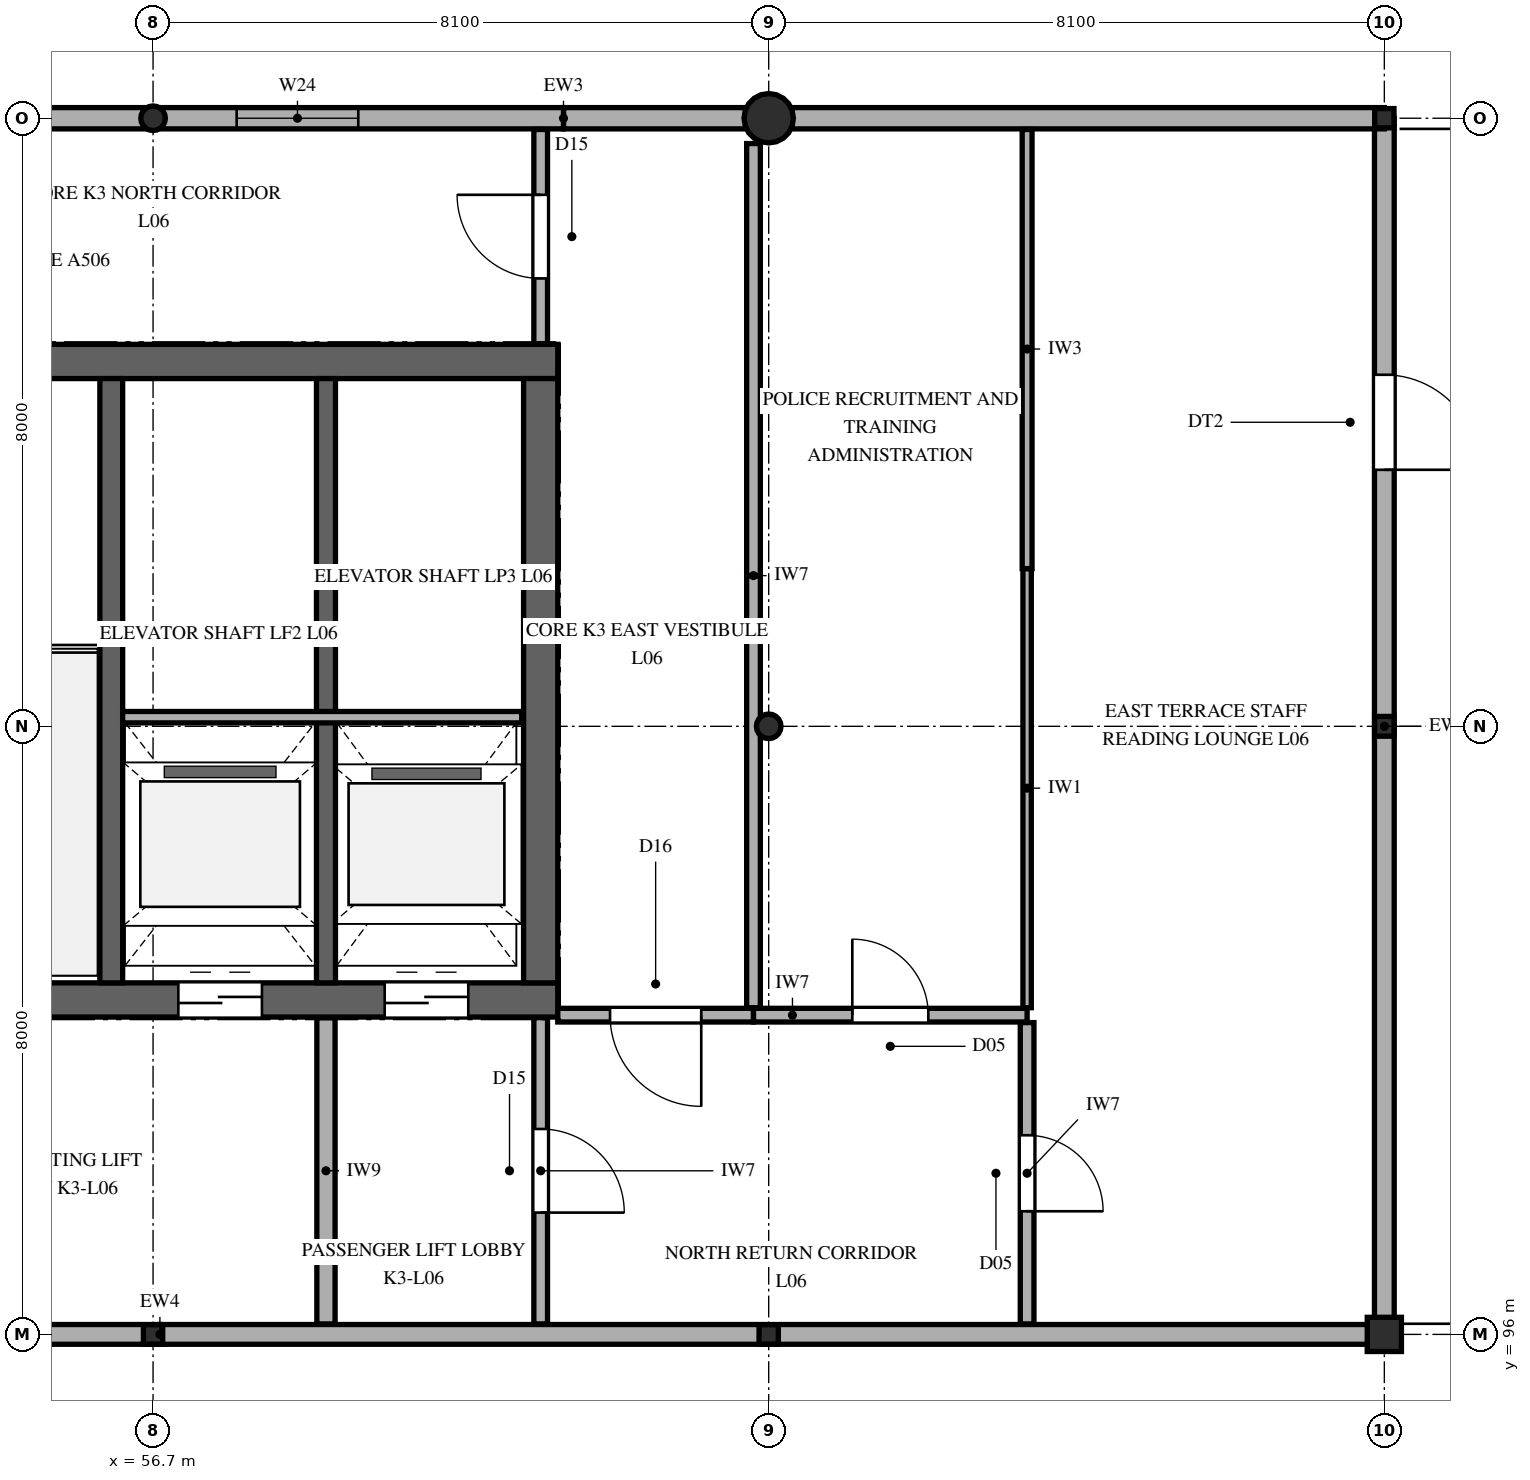
"""IFC4 building model, lengths in metres.
Left out: names, types, materials, properties, quantities, classifications, styles, units other than length and angle.
Written with IfcOpenShell. Run it as: python <this file> out.ifc"""

import sys

from ifc_helpers import new_model, si_unit, direction, frame, frame_2d, origin, origin_2d, place, context, subcontext, project, spatial, rectangle, hollow_rectangle, circle, hollow_circle, i_section, extrude, element, fill, save


model = new_model("IFC4")
c1 = context("Model", 3, precision=1e-05, world=origin(), true_north=direction((0.0, 1.0)))
c2 = subcontext(c1, "Body", "Model", "MODEL_VIEW")
j1 = project(units=[si_unit("LENGTHUNIT", "METRE"), si_unit("PLANEANGLEUNIT", "RADIAN")], contexts=[c1])
p1 = place(None, origin())
s1 = spatial("IfcSite", under=j1, at=p1, CompositionType="ELEMENT")
p2 = place(p1, origin())
s2 = spatial("IfcBuilding", under=s1, at=p2, CompositionType="ELEMENT")
p3 = place(p2, frame((0.0, 0.0, 29.1)))
s3 = spatial("IfcBuildingStorey", under=s2, at=p3, CompositionType="ELEMENT", Elevation=29.1)
p4 = place(p3, frame((46.775, 100.4, 0.0), z_axis=(0.0, 0.0, 1.0), x_axis=(1.0, 0.0, 0.0)))
e1 = element("IfcWall", 1, at=p4, inside=s3, PredefinedType="SHEAR", context=c2, shape_type="SweptSolid", body=[
    extrude(rectangle(XDim=15.25, YDim=0.45, at=frame_2d((7.625, 0.0))), origin(), (0.0, 0.0, 1.0), 4.2),
])
p5 = place(p4, frame((0.975, 0.0, 0.0)))
e2 = element("IfcOpeningElement", 2, at=p5, cuts=e1, PredefinedType="OPENING", context=c2, shape_type="SweptSolid", body=[
    extrude(rectangle(XDim=1.15, YDim=2.25, at=frame_2d((0.575, 1.125))), frame((0.0, 0.235, 0.0), z_axis=(0.0, -1.0, 0.0), x_axis=(1.0, 0.0, 0.0)), (0.0, 0.0, 1.0), 0.47),
])
p6 = place(p4, frame((10.258, 0.0, 0.0)))
e3 = element("IfcOpeningElement", 3, at=p6, cuts=e1, PredefinedType="OPENING", context=c2, shape_type="SweptSolid", body=[
    extrude(rectangle(XDim=1.1, YDim=2.2, at=frame_2d((0.55, 1.1))), frame((0.0, 0.235, 0.0), z_axis=(0.0, -1.0, 0.0), x_axis=(1.0, 0.0, 0.0)), (0.0, 0.0, 1.0), 0.47),
])
p7 = place(p4, frame((12.972, 0.0, 0.0)))
e4 = element("IfcOpeningElement", 4, at=p7, cuts=e1, PredefinedType="OPENING", context=c2, shape_type="SweptSolid", body=[
    extrude(rectangle(XDim=1.1, YDim=2.2, at=frame_2d((0.55, 1.1))), frame((0.0, 0.235, 0.0), z_axis=(0.0, -1.0, 0.0), x_axis=(1.0, 0.0, 0.0)), (0.0, 0.0, 1.0), 0.47),
])
p8 = place(p3, frame((46.775, 108.8, 0.0), z_axis=(0.0, 0.0, 1.0), x_axis=(1.0, 0.0, 0.0)))
e5 = element("IfcWall", 5, at=p8, inside=s3, PredefinedType="SHEAR", context=c2, shape_type="SweptSolid", body=[
    extrude(rectangle(XDim=15.25, YDim=0.45, at=frame_2d((7.625, 0.0))), origin(), (0.0, 0.0, 1.0), 4.2),
])
p9 = place(p3, frame((61.8, 100.625, 0.0), z_axis=(0.0, 0.0, 1.0), x_axis=(0.0, 1.0, 0.0)))
e6 = element("IfcWall", 6, at=p9, inside=s3, PredefinedType="SHEAR", context=c2, shape_type="SweptSolid", body=[
    extrude(rectangle(XDim=7.95, YDim=0.45, at=frame_2d((3.975, 0.0))), origin(), (0.0, 0.0, 1.0), 4.2),
])
p10 = place(p3, frame((56.15, 100.625, 0.0), z_axis=(0.0, 0.0, 1.0), x_axis=(0.0, 1.0, 0.0)))
e7 = element("IfcWall", 7, at=p10, inside=s3, PredefinedType="SHEAR", context=c2, shape_type="SweptSolid", body=[
    extrude(rectangle(XDim=7.95, YDim=0.3, at=frame_2d((3.975, 0.0))), origin(), (0.0, 0.0, 1.0), 4.2),
])
p11 = place(p3, frame((58.975, 100.625, 0.0), z_axis=(0.0, 0.0, 1.0), x_axis=(0.0, 1.0, 0.0)))
e8 = element("IfcWall", 8, at=p11, inside=s3, PredefinedType="SHEAR", context=c2, shape_type="SweptSolid", body=[
    extrude(rectangle(XDim=7.95, YDim=0.25, at=frame_2d((3.975, 0.0))), origin(), (0.0, 0.0, 1.0), 4.2),
])
p12 = place(p3, frame((56.7, 96.0, 0.0), z_axis=(0.0, 0.0, 1.0), x_axis=(1.0, 0.0, 0.0)))
e9 = element("IfcColumn", 9, at=p12, inside=s3, PredefinedType="COLUMN", context=c2, shape_type="SweptSolid", body=[
    extrude(hollow_rectangle(XDim=0.254, YDim=0.254, WallThickness=0.013, InnerFilletRadius=0.013, OuterFilletRadius=0.025, at=origin_2d()), origin(), (0.0, 0.0, 1.0), 4.2),
])
p13 = place(p3, frame((56.7, 112.0, 0.0), z_axis=(0.0, 0.0, 1.0), x_axis=(1.0, 0.0, 0.0)))
e10 = element("IfcColumn", 10, at=p13, inside=s3, PredefinedType="COLUMN", context=c2, shape_type="SweptSolid", body=[
    extrude(hollow_circle(Radius=0.162, WallThickness=0.013, at=origin_2d()), origin(), (0.0, 0.0, 1.0), 4.2),
])
p14 = place(p3, frame((64.8, 96.0, 0.0), z_axis=(0.0, 0.0, 1.0), x_axis=(1.0, 0.0, 0.0)))
e11 = element("IfcColumn", 11, at=p14, inside=s3, PredefinedType="COLUMN", context=c2, shape_type="SweptSolid", body=[
    extrude(hollow_rectangle(XDim=0.254, YDim=0.254, WallThickness=0.013, InnerFilletRadius=0.013, OuterFilletRadius=0.025, at=origin_2d()), origin(), (0.0, 0.0, 1.0), 4.2),
])
p15 = place(p3, frame((64.8, 104.0, 0.0), z_axis=(0.0, 0.0, 1.0), x_axis=(1.0, 0.0, 0.0)))
e12 = element("IfcColumn", 12, at=p15, inside=s3, PredefinedType="COLUMN", context=c2, shape_type="SweptSolid", body=[
    extrude(hollow_circle(Radius=0.162, WallThickness=0.013, at=origin_2d()), origin(), (0.0, 0.0, 1.0), 4.2),
])
p16 = place(p3, frame((64.8, 112.0, 0.0), z_axis=(0.0, 0.0, 1.0), x_axis=(1.0, 0.0, 0.0)))
e13 = element("IfcColumn", 13, at=p16, inside=s3, PredefinedType="COLUMN", context=c2, shape_type="SweptSolid", body=[
    extrude(circle(Radius=0.325, at=origin_2d()), origin(), (0.0, 0.0, 1.0), 4.2),
])
p17 = place(p3, frame((72.9, 96.0, 0.0), z_axis=(0.0, 0.0, 1.0), x_axis=(1.0, 0.0, 0.0)))
e14 = element("IfcColumn", 14, at=p17, inside=s3, PredefinedType="COLUMN", context=c2, shape_type="SweptSolid", body=[
    extrude(rectangle(XDim=0.45, YDim=0.45, at=origin_2d()), origin(), (0.0, 0.0, 1.0), 3.86),
])
p18 = place(p3, frame((72.9, 104.0, 0.0), z_axis=(0.0, 0.0, 1.0), x_axis=(1.0, 0.0, 0.0)))
e15 = element("IfcColumn", 15, at=p18, inside=s3, PredefinedType="COLUMN", context=c2, shape_type="SweptSolid", body=[
    extrude(i_section(OverallWidth=0.256, OverallDepth=0.26, WebThickness=0.011, FlangeThickness=0.017, FilletRadius=0.013, at=origin_2d()), origin(), (0.0, 0.0, 1.0), 3.86),
])
p19 = place(p3, frame((72.9, 112.0, 0.0), z_axis=(0.0, 0.0, 1.0), x_axis=(1.0, 0.0, 0.0)))
e16 = element("IfcColumn", 16, at=p19, inside=s3, PredefinedType="COLUMN", context=c2, shape_type="SweptSolid", body=[
    extrude(hollow_rectangle(XDim=0.254, YDim=0.254, WallThickness=0.013, InnerFilletRadius=0.013, OuterFilletRadius=0.025, at=origin_2d()), origin(), (0.0, 0.0, 1.0), 3.86),
])
p20 = place(p3, frame((40.68, 96.0, 0.0), z_axis=(0.0, 0.0, 1.0), x_axis=(1.0, 0.0, 0.0)))
e17 = element("IfcWall", 17, at=p20, inside=s3, PredefinedType="SOLIDWALL", context=c2, shape_type="SweptSolid", body=[
    extrude(rectangle(XDim=16.11, YDim=0.26, at=frame_2d((8.055, 0.0))), origin(), (0.0, 0.0, 1.0), 3.402),
])
p21 = place(p3, frame((56.79, 96.0, 0.0), z_axis=(0.0, 0.0, 1.0), x_axis=(1.0, 0.0, 0.0)))
e18 = element("IfcWall", 18, at=p21, inside=s3, PredefinedType="SOLIDWALL", context=c2, shape_type="SweptSolid", body=[
    extrude(rectangle(XDim=16.11, YDim=0.26, at=frame_2d((8.055, 0.0))), origin(), (0.0, 0.0, 1.0), 3.302),
])
p22 = place(p3, frame((72.9, 96.0, 0.0), z_axis=(0.0, 0.0, 1.0), x_axis=(0.0, 1.0, 0.0)))
e19 = element("IfcWall", 19, at=p22, inside=s3, PredefinedType="SOLIDWALL", context=c2, shape_type="SweptSolid", body=[
    extrude(rectangle(XDim=16.0, YDim=0.26, at=frame_2d((8.0, 0.0))), origin(), (0.0, 0.0, 1.0), 3.389),
])
p23 = place(p22, frame((11.375, 0.0, 0.0)))
e20 = element("IfcOpeningElement", 20, at=p23, cuts=e19, PredefinedType="OPENING", context=c2, shape_type="SweptSolid", body=[
    extrude(rectangle(XDim=1.25, YDim=2.25, at=frame_2d((0.625, 1.125))), frame((0.0, 0.14, 0.0), z_axis=(0.0, -1.0, 0.0), x_axis=(1.0, 0.0, 0.0)), (0.0, 0.0, 1.0), 0.28),
])
p24 = place(p3, frame((72.9, 112.0, 0.0), z_axis=(0.0, 0.0, 1.0), x_axis=(-1.0, 0.0, 0.0)))
e21 = element("IfcWall", 21, at=p24, inside=s3, PredefinedType="SOLIDWALL", context=c2, shape_type="SweptSolid", body=[
    extrude(rectangle(XDim=10.8, YDim=0.28, at=frame_2d((5.4, 0.0))), origin(), (0.0, 0.0, 1.0), 3.302),
])
p25 = place(p3, frame((62.1, 112.0, 0.0), z_axis=(0.0, 0.0, 1.0), x_axis=(-1.0, 0.0, 0.0)))
e22 = element("IfcWall", 22, at=p25, inside=s3, PredefinedType="SOLIDWALL", context=c2, shape_type="SweptSolid", body=[
    extrude(rectangle(XDim=10.8, YDim=0.28, at=frame_2d((5.4, 0.0))), origin(), (0.0, 0.0, 1.0), 3.302),
])
p26 = place(p25, frame((2.7, 0.0, 0.95)))
e23 = element("IfcOpeningElement", 23, at=p26, cuts=e22, PredefinedType="OPENING", context=c2, shape_type="SweptSolid", body=[
    extrude(rectangle(XDim=1.6, YDim=1.4, at=frame_2d((0.8, 0.7))), frame((0.0, 0.15, 0.0), z_axis=(0.0, -1.0, 0.0), x_axis=(1.0, 0.0, 0.0)), (0.0, 0.0, 1.0), 0.3),
])
p27 = place(p3, frame((56.3, 104.12, 0.0), z_axis=(0.0, 0.0, 1.0), x_axis=(1.0, 0.0, 0.0)))
e24 = element("IfcWall", 24, at=p27, inside=s3, PredefinedType="PARTITIONING", context=c2, shape_type="SweptSolid", body=[
    extrude(rectangle(XDim=5.25, YDim=0.15, at=frame_2d((2.625, 0.0))), origin(), (0.0, 0.0, 1.0), 3.96),
])
p28 = place(p3, frame((62.025, 100.2, 0.0), z_axis=(0.0, 0.0, 1.0), x_axis=(1.0, 0.0, 0.0)))
e25 = element("IfcWall", 25, at=p28, inside=s3, PredefinedType="PARTITIONING", context=c2, shape_type="SweptSolid", body=[
    extrude(rectangle(XDim=2.575, YDim=0.18, at=frame_2d((1.288, 0.0))), origin(), (0.0, 0.0, 1.0), 3.96),
])
p29 = place(p28, frame((0.688, 0.0, 0.0)))
e26 = element("IfcOpeningElement", 26, at=p29, cuts=e25, PredefinedType="OPENING", context=c2, shape_type="SweptSolid", body=[
    extrude(rectangle(XDim=1.2, YDim=2.2, at=frame_2d((0.6, 1.1))), frame((0.0, 0.1, 0.0), z_axis=(0.0, -1.0, 0.0), x_axis=(1.0, 0.0, 0.0)), (0.0, 0.0, 1.0), 0.2),
])
p30 = place(p3, frame((64.6, 100.2, 0.0), z_axis=(0.0, 0.0, 1.0), x_axis=(1.0, 0.0, 0.0)))
e27 = element("IfcWall", 27, at=p30, inside=s3, PredefinedType="PARTITIONING", context=c2, shape_type="SweptSolid", body=[
    extrude(rectangle(XDim=3.6, YDim=0.18, at=frame_2d((1.8, 0.0))), origin(), (0.0, 0.0, 1.0), 3.96),
])
p31 = place(p30, frame((1.3, 0.0, 0.0)))
e28 = element("IfcOpeningElement", 28, at=p31, cuts=e27, PredefinedType="OPENING", context=c2, shape_type="SweptSolid", body=[
    extrude(rectangle(XDim=1.0, YDim=2.2, at=frame_2d((0.5, 1.1))), frame((0.0, 0.1, 0.0), z_axis=(0.0, -1.0, 0.0), x_axis=(1.0, 0.0, 0.0)), (0.0, 0.0, 1.0), 0.2),
])
p32 = place(p3, frame((58.975, 96.138, 0.0), z_axis=(0.0, 0.0, 1.0), x_axis=(0.0, 1.0, 0.0)))
e29 = element("IfcWall", 29, at=p32, inside=s3, PredefinedType="PARTITIONING", context=c2, shape_type="SweptSolid", body=[
    extrude(rectangle(XDim=4.029, YDim=0.24, at=frame_2d((2.015, 0.0))), origin(), (0.0, 0.0, 1.0), 3.96),
])
p33 = place(p3, frame((61.8, 96.138, 0.0), z_axis=(0.0, 0.0, 1.0), x_axis=(0.0, 1.0, 0.0)))
e30 = element("IfcWall", 30, at=p33, inside=s3, PredefinedType="PARTITIONING", context=c2, shape_type="SweptSolid", body=[
    extrude(rectangle(XDim=4.029, YDim=0.18, at=frame_2d((2.015, 0.0))), origin(), (0.0, 0.0, 1.0), 3.96),
])
p34 = place(p33, frame((1.465, 0.0, 0.0)))
e31 = element("IfcOpeningElement", 31, at=p34, cuts=e30, PredefinedType="OPENING", context=c2, shape_type="SweptSolid", body=[
    extrude(rectangle(XDim=1.1, YDim=2.2, at=frame_2d((0.55, 1.1))), frame((0.0, 0.1, 0.0), z_axis=(0.0, -1.0, 0.0), x_axis=(1.0, 0.0, 0.0)), (0.0, 0.0, 1.0), 0.2),
])
p35 = place(p3, frame((61.8, 109.033, 0.0), z_axis=(0.0, 0.0, 1.0), x_axis=(0.0, 1.0, 0.0)))
e32 = element("IfcWall", 32, at=p35, inside=s3, PredefinedType="PARTITIONING", context=c2, shape_type="SweptSolid", body=[
    extrude(rectangle(XDim=2.819, YDim=0.18, at=frame_2d((1.41, 0.0))), origin(), (0.0, 0.0, 1.0), 3.96),
])
p36 = place(p35, frame((0.86, 0.0, 0.0)))
e33 = element("IfcOpeningElement", 33, at=p36, cuts=e32, PredefinedType="OPENING", context=c2, shape_type="SweptSolid", body=[
    extrude(rectangle(XDim=1.1, YDim=2.2, at=frame_2d((0.55, 1.1))), frame((0.0, 0.1, 0.0), z_axis=(0.0, -1.0, 0.0), x_axis=(1.0, 0.0, 0.0)), (0.0, 0.0, 1.0), 0.2),
])
p37 = place(p3, frame((64.6, 100.298, 0.0), z_axis=(0.0, 0.0, 1.0), x_axis=(0.0, 1.0, 0.0)))
e34 = element("IfcWall", 34, at=p37, inside=s3, PredefinedType="PARTITIONING", context=c2, shape_type="SweptSolid", body=[
    extrude(rectangle(XDim=5.684, YDim=0.18, at=frame_2d((2.842, 0.0))), origin(), (0.0, 0.0, 1.0), 3.352),
])
p38 = place(p3, frame((64.6, 105.982, 0.0), z_axis=(0.0, 0.0, 1.0), x_axis=(0.0, 1.0, 0.0)))
e35 = element("IfcWall", 35, at=p38, inside=s3, PredefinedType="PARTITIONING", context=c2, shape_type="SweptSolid", body=[
    extrude(rectangle(XDim=5.685, YDim=0.18, at=frame_2d((2.842, 0.0))), origin(), (0.0, 0.0, 1.0), 3.352),
])
p39 = place(p3, frame((68.2, 96.138, 0.0), z_axis=(0.0, 0.0, 1.0), x_axis=(0.0, 1.0, 0.0)))
e36 = element("IfcWall", 36, at=p39, inside=s3, PredefinedType="PARTITIONING", context=c2, shape_type="SweptSolid", body=[
    extrude(rectangle(XDim=3.964, YDim=0.18, at=frame_2d((1.982, 0.0))), origin(), (0.0, 0.0, 1.0), 3.96),
])
p40 = place(p39, frame((1.482, 0.0, 0.0)))
e37 = element("IfcOpeningElement", 37, at=p40, cuts=e36, PredefinedType="OPENING", context=c2, shape_type="SweptSolid", body=[
    extrude(rectangle(XDim=1.0, YDim=2.2, at=frame_2d((0.5, 1.1))), frame((0.0, 0.1, 0.0), z_axis=(0.0, -1.0, 0.0), x_axis=(1.0, 0.0, 0.0)), (0.0, 0.0, 1.0), 0.2),
])
p41 = place(p3, frame((68.2, 100.298, 0.0), z_axis=(0.0, 0.0, 1.0), x_axis=(0.0, 1.0, 0.0)))
e38 = element("IfcWall", 38, at=p41, inside=s3, PredefinedType="PARTITIONING", context=c2, shape_type="SweptSolid", body=[
    extrude(rectangle(XDim=5.777, YDim=0.11, at=frame_2d((2.888, 0.0))), origin(), (0.0, 0.0, 1.0), 3.96),
])
p42 = place(p3, frame((68.2, 106.075, 0.0), z_axis=(0.0, 0.0, 1.0), x_axis=(0.0, 1.0, 0.0)))
e39 = element("IfcWall", 39, at=p42, inside=s3, PredefinedType="PARTITIONING", context=c2, shape_type="SweptSolid", body=[
    extrude(rectangle(XDim=5.777, YDim=0.13, at=frame_2d((2.889, 0.0))), origin(), (0.0, 0.0, 1.0), 3.96),
])
p43 = place(p23, frame((1.25, 0.0, 0.0), z_axis=(0.0, 0.0, 1.0), x_axis=(-1.0, 0.0, 0.0)))
e40 = element("IfcDoor", 40, at=p43, inside=s3, OperationType="SINGLE_SWING_LEFT", PredefinedType="DOOR", context=c2, shape_type="SweptSolid", body=[
    extrude(rectangle(XDim=1.25, YDim=2.25, at=frame_2d((0.625, 1.125))), frame((0.0, 0.025, 0.0), z_axis=(0.0, -1.0, 0.0), x_axis=(1.0, 0.0, 0.0)), (0.0, 0.0, 1.0), 0.05),
])
fill(e20, e40)
p44 = place(p26, origin())
e41 = element("IfcWindow", 41, at=p44, inside=s3, PartitioningType="SINGLE_PANEL", PredefinedType="WINDOW", context=c2, shape_type="SweptSolid", body=[
    extrude(rectangle(XDim=1.6, YDim=1.4, at=frame_2d((0.8, 0.7))), frame((0.0, 0.03, 0.0), z_axis=(0.0, -1.0, 0.0), x_axis=(1.0, 0.0, 0.0)), (0.0, 0.0, 1.0), 0.06),
])
fill(e23, e41)
p45 = place(p6, frame((1.1, 0.0, 0.0), z_axis=(0.0, 0.0, 1.0), x_axis=(-1.0, 0.0, 0.0)))
e42 = element("IfcDoor", 42, at=p45, inside=s3, OperationType="DOUBLE_DOOR_SLIDING", PredefinedType="DOOR", context=c2, shape_type="SweptSolid", body=[
    extrude(rectangle(XDim=1.1, YDim=2.2, at=frame_2d((0.55, 1.1))), frame((0.0, 0.025, 0.0), z_axis=(0.0, -1.0, 0.0), x_axis=(1.0, 0.0, 0.0)), (0.0, 0.0, 1.0), 0.05),
])
fill(e3, e42)
p46 = place(p7, frame((1.1, 0.0, 0.0), z_axis=(0.0, 0.0, 1.0), x_axis=(-1.0, 0.0, 0.0)))
e43 = element("IfcDoor", 43, at=p46, inside=s3, OperationType="DOUBLE_DOOR_SLIDING", PredefinedType="DOOR", context=c2, shape_type="SweptSolid", body=[
    extrude(rectangle(XDim=1.1, YDim=2.2, at=frame_2d((0.55, 1.1))), frame((0.0, 0.025, 0.0), z_axis=(0.0, -1.0, 0.0), x_axis=(1.0, 0.0, 0.0)), (0.0, 0.0, 1.0), 0.05),
])
fill(e4, e43)
p47 = place(p29, frame((1.2, 0.0, 0.0), z_axis=(0.0, 0.0, 1.0), x_axis=(-1.0, 0.0, 0.0)))
e44 = element("IfcDoor", 44, at=p47, inside=s3, OperationType="SINGLE_SWING_RIGHT", PredefinedType="DOOR", context=c2, shape_type="SweptSolid", body=[
    extrude(rectangle(XDim=1.2, YDim=2.2, at=frame_2d((0.6, 1.1))), frame((0.0, 0.025, 0.0), z_axis=(0.0, -1.0, 0.0), x_axis=(1.0, 0.0, 0.0)), (0.0, 0.0, 1.0), 0.05),
])
fill(e26, e44)
p48 = place(p31, origin())
e45 = element("IfcDoor", 45, at=p48, inside=s3, OperationType="SINGLE_SWING_LEFT", PredefinedType="DOOR", context=c2, shape_type="SweptSolid", body=[
    extrude(rectangle(XDim=1.0, YDim=2.2, at=frame_2d((0.5, 1.1))), frame((0.0, 0.025, 0.0), z_axis=(0.0, -1.0, 0.0), x_axis=(1.0, 0.0, 0.0)), (0.0, 0.0, 1.0), 0.05),
])
fill(e28, e45)
p49 = place(p34, frame((1.1, 0.0, 0.0), z_axis=(0.0, 0.0, 1.0), x_axis=(-1.0, 0.0, 0.0)))
e46 = element("IfcDoor", 46, at=p49, inside=s3, OperationType="SINGLE_SWING_LEFT", PredefinedType="DOOR", context=c2, shape_type="SweptSolid", body=[
    extrude(rectangle(XDim=1.1, YDim=2.2, at=frame_2d((0.55, 1.1))), frame((0.0, 0.025, 0.0), z_axis=(0.0, -1.0, 0.0), x_axis=(1.0, 0.0, 0.0)), (0.0, 0.0, 1.0), 0.05),
])
fill(e31, e46)
p50 = place(p36, origin())
e47 = element("IfcDoor", 47, at=p50, inside=s3, OperationType="SINGLE_SWING_RIGHT", PredefinedType="DOOR", context=c2, shape_type="SweptSolid", body=[
    extrude(rectangle(XDim=1.1, YDim=2.2, at=frame_2d((0.55, 1.1))), frame((0.0, 0.025, 0.0), z_axis=(0.0, -1.0, 0.0), x_axis=(1.0, 0.0, 0.0)), (0.0, 0.0, 1.0), 0.05),
])
fill(e33, e47)
p51 = place(p40, frame((1.0, 0.0, 0.0), z_axis=(0.0, 0.0, 1.0), x_axis=(-1.0, 0.0, 0.0)))
e48 = element("IfcDoor", 48, at=p51, inside=s3, OperationType="SINGLE_SWING_LEFT", PredefinedType="DOOR", context=c2, shape_type="SweptSolid", body=[
    extrude(rectangle(XDim=1.0, YDim=2.2, at=frame_2d((0.5, 1.1))), frame((0.0, 0.025, 0.0), z_axis=(0.0, -1.0, 0.0), x_axis=(1.0, 0.0, 0.0)), (0.0, 0.0, 1.0), 0.05),
])
fill(e37, e48)
save(model, sys.argv[1])
